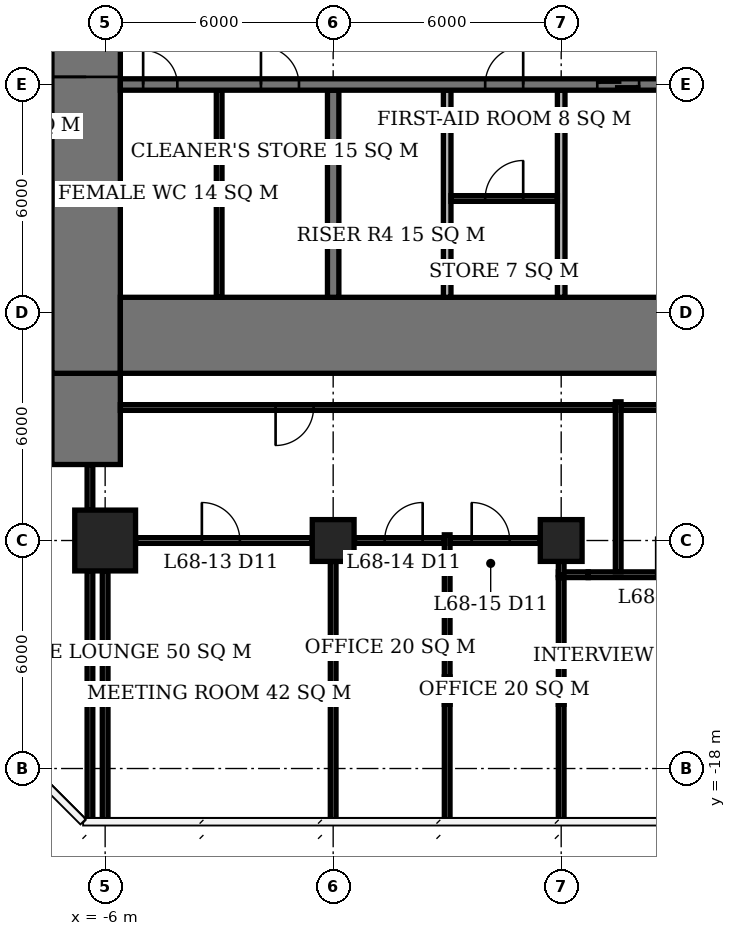
"""IFC4 building model, lengths in metres.
Left out: names, types, materials, properties, quantities, classifications, styles, units other than length and angle.
Written with IfcOpenShell. Run it as: python <this file> out.ifc"""

import sys

from ifc_helpers import new_model, si_unit, direction, frame, frame_2d, origin, origin_2d, place, context, subcontext, project, spatial, rectangle, extrude, element, fill, save


model = new_model("IFC4")
c1 = context("Model", 3, precision=1e-05, world=origin(), true_north=direction((0.0, 1.0)))
c2 = subcontext(c1, "Body", "Model", "MODEL_VIEW")
j1 = project(units=[si_unit("LENGTHUNIT", "METRE"), si_unit("PLANEANGLEUNIT", "RADIAN")], contexts=[c1])
p1 = place(None, origin())
s1 = spatial("IfcSite", under=j1, at=p1, CompositionType="ELEMENT")
p2 = place(p1, origin())
s2 = spatial("IfcBuilding", under=s1, at=p2, CompositionType="ELEMENT")
p3 = place(p2, frame((0.0, 0.0, 276.2)))
s3 = spatial("IfcBuildingStorey", under=s2, at=p3, CompositionType="ELEMENT", Elevation=276.2)
p4 = place(p3, frame((-6.0, -12.0, 0.0), z_axis=(0.0, 0.0, 1.0), x_axis=(1.0, 0.0, 0.0)))
e1 = element("IfcColumn", 1, at=p4, inside=s3, PredefinedType="COLUMN", context=c2, shape_type="SweptSolid", body=[
    extrude(rectangle(XDim=1.6, YDim=1.6, at=origin_2d()), origin(), (0.0, 0.0, 1.0), 3.9),
])
for number, where, z_axis, x_axis in (
    (2, (0.0, -12.0, 0.0), (0.0, 0.0, 1.0), (1.0, 0.0, 0.0)),
    (3, (6.0, -12.0, 0.0), (0.0, 0.0, 1.0), (1.0, 0.0, 0.0)),
):
    element("IfcColumn", number, at=place(p3, frame(where, z_axis=z_axis, x_axis=x_axis)), inside=s3, PredefinedType="COLUMN", context=c2, shape_type="SweptSolid", body=[
        extrude(rectangle(XDim=1.1, YDim=1.1, at=origin_2d()), origin(), (0.0, 0.0, 1.0), 3.9),
    ])
p5 = place(p3, frame((-5.6, -6.6, 0.0), z_axis=(0.0, 0.0, 1.0), x_axis=(1.0, 0.0, 0.0)))
e4 = element("IfcWall", 4, at=p5, inside=s3, PredefinedType="SHEAR", context=c2, shape_type="SweptSolid", body=[
    extrude(rectangle(XDim=23.2, YDim=2.0, at=frame_2d((11.6, 0.0))), origin(), (0.0, 0.0, 1.0), 3.9),
])
p6 = place(p3, frame((-6.5, -7.6, 0.0), z_axis=(0.0, 0.0, 1.0), x_axis=(0.0, 1.0, 0.0)))
e5 = element("IfcWall", 5, at=p6, inside=s3, PredefinedType="SHEAR", context=c2, shape_type="SweptSolid", body=[
    extrude(rectangle(XDim=21.2, YDim=1.8, at=frame_2d((10.6, 0.0))), origin(), (0.0, 0.0, 1.0), 3.9),
])
p7 = place(p6, frame((7.8, 0.0, 0.0)))
e6 = element("IfcOpeningElement", 6, at=p7, cuts=e5, PredefinedType="OPENING", context=c2, shape_type="SweptSolid", body=[
    extrude(rectangle(XDim=1.8, YDim=2.4, at=frame_2d((0.9, 1.2))), frame((0.0, 0.91, 0.0), z_axis=(0.0, -1.0, 0.0), x_axis=(1.0, 0.0, 0.0)), (0.0, 0.0, 1.0), 1.82),
])
p8 = place(p3, frame((-6.5, -10.0, 0.0), z_axis=(0.0, 0.0, 1.0), x_axis=(0.0, 1.0, 0.0)))
e7 = element("IfcWall", 7, at=p8, inside=s3, PredefinedType="SHEAR", context=c2, shape_type="SweptSolid", body=[
    extrude(rectangle(XDim=2.4, YDim=1.8, at=frame_2d((1.2, 0.0))), origin(), (0.0, 0.0, 1.0), 3.9),
])
p9 = place(p3, frame((-5.6, 0.0, 0.0), z_axis=(0.0, 0.0, 1.0), x_axis=(1.0, 0.0, 0.0)))
e8 = element("IfcWall", 8, at=p9, inside=s3, PredefinedType="SHEAR", context=c2, shape_type="SweptSolid", body=[
    extrude(rectangle(XDim=17.75, YDim=0.3, at=frame_2d((8.875, 0.0))), origin(), (0.0, 0.0, 1.0), 3.9),
])
p10 = place(p9, frame((0.6, 0.0, 0.0)))
e9 = element("IfcOpeningElement", 9, at=p10, cuts=e8, PredefinedType="OPENING", context=c2, shape_type="SweptSolid", body=[
    extrude(rectangle(XDim=0.9, YDim=2.1, at=frame_2d((0.45, 1.05))), frame((0.0, 0.16, 0.0), z_axis=(0.0, -1.0, 0.0), x_axis=(1.0, 0.0, 0.0)), (0.0, 0.0, 1.0), 0.32),
])
p11 = place(p9, frame((3.7, 0.0, 0.0)))
e10 = element("IfcOpeningElement", 10, at=p11, cuts=e8, PredefinedType="OPENING", context=c2, shape_type="SweptSolid", body=[
    extrude(rectangle(XDim=1.0, YDim=2.1, at=frame_2d((0.5, 1.05))), frame((0.0, 0.16, 0.0), z_axis=(0.0, -1.0, 0.0), x_axis=(1.0, 0.0, 0.0)), (0.0, 0.0, 1.0), 0.32),
])
p12 = place(p9, frame((9.6, 0.0, 0.0)))
e11 = element("IfcOpeningElement", 11, at=p12, cuts=e8, PredefinedType="OPENING", context=c2, shape_type="SweptSolid", body=[
    extrude(rectangle(XDim=1.0, YDim=2.1, at=frame_2d((0.5, 1.05))), frame((0.0, 0.16, 0.0), z_axis=(0.0, -1.0, 0.0), x_axis=(1.0, 0.0, 0.0)), (0.0, 0.0, 1.0), 0.32),
])
p13 = place(p9, frame((12.55, 0.0, 0.0)))
e12 = element("IfcOpeningElement", 12, at=p13, cuts=e8, PredefinedType="OPENING", context=c2, shape_type="SweptSolid", body=[
    extrude(rectangle(XDim=1.1, YDim=2.1, at=frame_2d((0.55, 1.05))), frame((0.0, 0.16, 0.0), z_axis=(0.0, -1.0, 0.0), x_axis=(1.0, 0.0, 0.0)), (0.0, 0.0, 1.0), 0.32),
])
p14 = place(p9, frame((15.55, 0.0, 0.0)))
e13 = element("IfcOpeningElement", 13, at=p14, cuts=e8, PredefinedType="OPENING", context=c2, shape_type="SweptSolid", body=[
    extrude(rectangle(XDim=1.1, YDim=2.1, at=frame_2d((0.55, 1.05))), frame((0.0, 0.16, 0.0), z_axis=(0.0, -1.0, 0.0), x_axis=(1.0, 0.0, 0.0)), (0.0, 0.0, 1.0), 0.32),
])
p15 = place(p3, frame((0.0, -5.6, 0.0), z_axis=(0.0, 0.0, 1.0), x_axis=(0.0, 1.0, 0.0)))
e14 = element("IfcWall", 14, at=p15, inside=s3, PredefinedType="SHEAR", context=c2, shape_type="SweptSolid", body=[
    extrude(rectangle(XDim=5.45, YDim=0.3, at=frame_2d((2.725, 0.0))), origin(), (0.0, 0.0, 1.0), 3.9),
])
for number, where, z_axis, x_axis in (
    (15, (3.0, -5.6, 0.0), (0.0, 0.0, 1.0), (0.0, 1.0, 0.0)),
    (16, (6.0, -5.6, 0.0), (0.0, 0.0, 1.0), (0.0, 1.0, 0.0)),
):
    element("IfcWall", number, at=place(p3, frame(where, z_axis=z_axis, x_axis=x_axis)), inside=s3, PredefinedType="SOLIDWALL", context=c2, shape_type="SweptSolid", body=[
        extrude(rectangle(XDim=5.45, YDim=0.2, at=frame_2d((2.725, 0.0))), origin(), (0.0, 0.0, 1.0), 3.9),
    ])
p16 = place(p3, frame((-3.0, -5.6, 0.0), z_axis=(0.0, 0.0, 1.0), x_axis=(0.0, 1.0, 0.0)))
e17 = element("IfcWall", 17, at=p16, inside=s3, PredefinedType="PLUMBINGWALL", context=c2, shape_type="SweptSolid", body=[
    extrude(rectangle(XDim=5.45, YDim=0.15, at=frame_2d((2.725, 0.0))), origin(), (0.0, 0.0, 1.0), 3.65),
])
p17 = place(p3, frame((3.1, -3.0, 0.0), z_axis=(0.0, 0.0, 1.0), x_axis=(1.0, 0.0, 0.0)))
e18 = element("IfcWall", 18, at=p17, inside=s3, PredefinedType="PARTITIONING", context=c2, shape_type="SweptSolid", body=[
    extrude(rectangle(XDim=2.8, YDim=0.15, at=frame_2d((1.4, 0.0))), origin(), (0.0, 0.0, 1.0), 3.65),
])
p18 = place(p17, frame((0.9, 0.0, 0.0)))
e19 = element("IfcOpeningElement", 19, at=p18, cuts=e18, PredefinedType="OPENING", context=c2, shape_type="SweptSolid", body=[
    extrude(rectangle(XDim=1.0, YDim=2.1, at=frame_2d((0.5, 1.05))), frame((0.0, 0.085, 0.0), z_axis=(0.0, -1.0, 0.0), x_axis=(1.0, 0.0, 0.0)), (0.0, 0.0, 1.0), 0.17),
])
p19 = place(p3, frame((5.925, -12.9, 0.0), z_axis=(0.0, 0.0, 1.0), x_axis=(1.0, 0.0, 0.0)))
e20 = element("IfcWall", 20, at=p19, inside=s3, PredefinedType="PARTITIONING", context=c2, shape_type="SweptSolid", body=[
    extrude(rectangle(XDim=0.785, YDim=0.15, at=frame_2d((0.393, 0.0))), origin(), (0.0, 0.0, 1.0), 2.65),
])
p20 = place(p3, frame((6.71, -12.9, 0.0), z_axis=(0.0, 0.0, 1.0), x_axis=(1.0, 0.0, 0.0)))
e21 = element("IfcWall", 21, at=p20, inside=s3, PredefinedType="PARTITIONING", context=c2, shape_type="SweptSolid", body=[
    extrude(rectangle(XDim=4.58, YDim=0.15, at=frame_2d((2.29, 0.0))), origin(), (0.0, 0.0, 1.0), 3.65),
])
p21 = place(p20, frame((1.79, 0.0, 0.0)))
e22 = element("IfcOpeningElement", 22, at=p21, cuts=e21, PredefinedType="OPENING", context=c2, shape_type="SweptSolid", body=[
    extrude(rectangle(XDim=1.0, YDim=2.4, at=frame_2d((0.5, 1.2))), frame((0.0, 0.085, 0.0), z_axis=(0.0, -1.0, 0.0), x_axis=(1.0, 0.0, 0.0)), (0.0, 0.0, 1.0), 0.17),
])
p22 = place(p3, frame((-5.2, -12.0, 0.0), z_axis=(0.0, 0.0, 1.0), x_axis=(1.0, 0.0, 0.0)))
e23 = element("IfcWall", 23, at=p22, inside=s3, PredefinedType="PARTITIONING", context=c2, shape_type="SweptSolid", body=[
    extrude(rectangle(XDim=4.64, YDim=0.15, at=frame_2d((2.32, 0.0))), origin(), (0.0, 0.0, 1.0), 3.65),
])
p23 = place(p22, frame((1.745, 0.0, 0.0)))
e24 = element("IfcOpeningElement", 24, at=p23, cuts=e23, PredefinedType="OPENING", context=c2, shape_type="SweptSolid", body=[
    extrude(rectangle(XDim=1.0, YDim=2.4, at=frame_2d((0.5, 1.2))), frame((0.0, 0.085, 0.0), z_axis=(0.0, -1.0, 0.0), x_axis=(1.0, 0.0, 0.0)), (0.0, 0.0, 1.0), 0.17),
])
p24 = place(p3, frame((0.56, -12.0, 0.0), z_axis=(0.0, 0.0, 1.0), x_axis=(1.0, 0.0, 0.0)))
e25 = element("IfcWall", 25, at=p24, inside=s3, PredefinedType="PARTITIONING", context=c2, shape_type="SweptSolid", body=[
    extrude(rectangle(XDim=2.365, YDim=0.15, at=frame_2d((1.183, 0.0))), origin(), (0.0, 0.0, 1.0), 3.65),
])
p25 = place(p24, frame((0.795, 0.0, 0.0)))
e26 = element("IfcOpeningElement", 26, at=p25, cuts=e25, PredefinedType="OPENING", context=c2, shape_type="SweptSolid", body=[
    extrude(rectangle(XDim=1.0, YDim=2.4, at=frame_2d((0.5, 1.2))), frame((0.0, 0.085, 0.0), z_axis=(0.0, -1.0, 0.0), x_axis=(1.0, 0.0, 0.0)), (0.0, 0.0, 1.0), 0.17),
])
p26 = place(p3, frame((3.075, -12.0, 0.0), z_axis=(0.0, 0.0, 1.0), x_axis=(1.0, 0.0, 0.0)))
e27 = element("IfcWall", 27, at=p26, inside=s3, PredefinedType="PARTITIONING", context=c2, shape_type="SweptSolid", body=[
    extrude(rectangle(XDim=2.365, YDim=0.15, at=frame_2d((1.183, 0.0))), origin(), (0.0, 0.0, 1.0), 3.65),
])
p27 = place(p26, frame((0.57, 0.0, 0.0)))
e28 = element("IfcOpeningElement", 28, at=p27, cuts=e27, PredefinedType="OPENING", context=c2, shape_type="SweptSolid", body=[
    extrude(rectangle(XDim=1.0, YDim=2.4, at=frame_2d((0.5, 1.2))), frame((0.0, 0.085, 0.0), z_axis=(0.0, -1.0, 0.0), x_axis=(1.0, 0.0, 0.0)), (0.0, 0.0, 1.0), 0.17),
])
p28 = place(p3, frame((-6.0, -19.375, 0.0), z_axis=(0.0, 0.0, 1.0), x_axis=(0.0, 1.0, 0.0)))
e29 = element("IfcWall", 29, at=p28, inside=s3, PredefinedType="PARTITIONING", context=c2, shape_type="SweptSolid", body=[
    extrude(rectangle(XDim=3.065, YDim=0.15, at=frame_2d((1.532, 0.0))), origin(), (0.0, 0.0, 1.0), 3.65),
])
p29 = place(p3, frame((-6.0, -16.31, 0.0), z_axis=(0.0, 0.0, 1.0), x_axis=(0.0, 1.0, 0.0)))
e30 = element("IfcWall", 30, at=p29, inside=s3, PredefinedType="PARTITIONING", context=c2, shape_type="SweptSolid", body=[
    extrude(rectangle(XDim=3.51, YDim=0.15, at=frame_2d((1.755, 0.0))), origin(), (0.0, 0.0, 1.0), 2.65),
])
p30 = place(p3, frame((0.0, -19.375, 0.0), z_axis=(0.0, 0.0, 1.0), x_axis=(0.0, 1.0, 0.0)))
e31 = element("IfcWall", 31, at=p30, inside=s3, PredefinedType="PARTITIONING", context=c2, shape_type="SweptSolid", body=[
    extrude(rectangle(XDim=3.065, YDim=0.15, at=frame_2d((1.532, 0.0))), origin(), (0.0, 0.0, 1.0), 3.65),
])
p31 = place(p3, frame((0.0, -16.31, 0.0), z_axis=(0.0, 0.0, 1.0), x_axis=(0.0, 1.0, 0.0)))
e32 = element("IfcWall", 32, at=p31, inside=s3, PredefinedType="PARTITIONING", context=c2, shape_type="SweptSolid", body=[
    extrude(rectangle(XDim=3.76, YDim=0.15, at=frame_2d((1.88, 0.0))), origin(), (0.0, 0.0, 1.0), 2.65),
])
p32 = place(p3, frame((3.0, -19.375, 0.0), z_axis=(0.0, 0.0, 1.0), x_axis=(0.0, 1.0, 0.0)))
e33 = element("IfcWall", 33, at=p32, inside=s3, PredefinedType="PARTITIONING", context=c2, shape_type="SweptSolid", body=[
    extrude(rectangle(XDim=3.065, YDim=0.15, at=frame_2d((1.532, 0.0))), origin(), (0.0, 0.0, 1.0), 3.65),
])
p33 = place(p3, frame((3.0, -16.31, 0.0), z_axis=(0.0, 0.0, 1.0), x_axis=(0.0, 1.0, 0.0)))
e34 = element("IfcWall", 34, at=p33, inside=s3, PredefinedType="PARTITIONING", context=c2, shape_type="SweptSolid", body=[
    extrude(rectangle(XDim=0.72, YDim=0.15, at=frame_2d((0.36, 0.0))), origin(), (0.0, 0.0, 1.0), 2.65),
])
p34 = place(p3, frame((3.0, -15.59, 0.0), z_axis=(0.0, 0.0, 1.0), x_axis=(0.0, 1.0, 0.0)))
e35 = element("IfcWall", 35, at=p34, inside=s3, PredefinedType="PARTITIONING", context=c2, shape_type="SweptSolid", body=[
    extrude(rectangle(XDim=3.74, YDim=0.15, at=frame_2d((1.87, 0.0))), origin(), (0.0, 0.0, 1.0), 3.65),
])
p35 = place(p3, frame((6.0, -19.35, 0.0), z_axis=(0.0, 0.0, 1.0), x_axis=(0.0, 1.0, 0.0)))
e36 = element("IfcWall", 36, at=p35, inside=s3, PredefinedType="PARTITIONING", context=c2, shape_type="SweptSolid", body=[
    extrude(rectangle(XDim=3.04, YDim=0.15, at=frame_2d((1.52, 0.0))), origin(), (0.0, 0.0, 1.0), 3.65),
])
p36 = place(p3, frame((6.0, -16.31, 0.0), z_axis=(0.0, 0.0, 1.0), x_axis=(0.0, 1.0, 0.0)))
e37 = element("IfcWall", 37, at=p36, inside=s3, PredefinedType="PARTITIONING", context=c2, shape_type="SweptSolid", body=[
    extrude(rectangle(XDim=3.335, YDim=0.15, at=frame_2d((1.667, 0.0))), origin(), (0.0, 0.0, 1.0), 2.65),
])
p37 = place(p3, frame((6.0, -12.9, 0.0), z_axis=(0.0, 0.0, 1.0), x_axis=(0.0, 1.0, 0.0)))
e38 = element("IfcWall", 38, at=p37, inside=s3, PredefinedType="PARTITIONING", context=c2, shape_type="SweptSolid", body=[
    extrude(rectangle(XDim=0.35, YDim=0.15, at=frame_2d((0.175, 0.0))), origin(), (0.0, 0.0, 1.0), 2.65),
])
p38 = place(p3, frame((-6.4, -19.375, 0.0), z_axis=(0.0, 0.0, 1.0), x_axis=(0.0, 1.0, 0.0)))
e39 = element("IfcWall", 39, at=p38, inside=s3, PredefinedType="PARTITIONING", context=c2, shape_type="SweptSolid", body=[
    extrude(rectangle(XDim=3.235, YDim=0.15, at=frame_2d((1.618, 0.0))), origin(), (0.0, 0.0, 1.0), 3.65),
])
p39 = place(p3, frame((-6.4, -16.14, 0.0), z_axis=(0.0, 0.0, 1.0), x_axis=(0.0, 1.0, 0.0)))
e40 = element("IfcWall", 40, at=p39, inside=s3, PredefinedType="PARTITIONING", context=c2, shape_type="SweptSolid", body=[
    extrude(rectangle(XDim=3.34, YDim=0.15, at=frame_2d((1.67, 0.0))), origin(), (0.0, 0.0, 1.0), 2.65),
])
p40 = place(p3, frame((-6.4, -11.2, 0.0), z_axis=(0.0, 0.0, 1.0), x_axis=(0.0, 1.0, 0.0)))
e41 = element("IfcWall", 41, at=p40, inside=s3, PredefinedType="PARTITIONING", context=c2, shape_type="SweptSolid", body=[
    extrude(rectangle(XDim=1.2, YDim=0.15, at=frame_2d((0.6, 0.0))), origin(), (0.0, 0.0, 1.0), 3.65),
])
p41 = place(p3, frame((7.425, -8.5, 0.0), z_axis=(0.0, 0.0, 1.0), x_axis=(-1.0, 0.0, 0.0)))
e42 = element("IfcWall", 42, at=p41, inside=s3, PredefinedType="PARTITIONING", context=c2, shape_type="SweptSolid", body=[
    extrude(rectangle(XDim=13.025, YDim=0.15, at=frame_2d((6.513, 0.0))), origin(), (0.0, 0.0, 1.0), 3.65),
])
p42 = place(p41, frame((7.94, 0.0, 0.0)))
e43 = element("IfcOpeningElement", 43, at=p42, cuts=e42, PredefinedType="OPENING", context=c2, shape_type="SweptSolid", body=[
    extrude(rectangle(XDim=1.0, YDim=2.4, at=frame_2d((0.5, 1.2))), frame((0.0, 0.085, 0.0), z_axis=(0.0, -1.0, 0.0), x_axis=(1.0, 0.0, 0.0)), (0.0, 0.0, 1.0), 0.17),
])
p43 = place(p3, frame((7.5, -12.825, 0.0), z_axis=(0.0, 0.0, 1.0), x_axis=(0.0, 1.0, 0.0)))
e44 = element("IfcWall", 44, at=p43, inside=s3, PredefinedType="PARTITIONING", context=c2, shape_type="SweptSolid", body=[
    extrude(rectangle(XDim=4.475, YDim=0.15, at=frame_2d((2.237, 0.0))), origin(), (0.0, 0.0, 1.0), 3.65),
])
p44 = place(p3, frame((7.575, -8.5, 0.0), z_axis=(0.0, 0.0, 1.0), x_axis=(1.0, 0.0, 0.0)))
e45 = element("IfcWall", 45, at=p44, inside=s3, PredefinedType="PARTITIONING", context=c2, shape_type="SweptSolid", body=[
    extrude(rectangle(XDim=10.025, YDim=0.15, at=frame_2d((5.013, 0.0))), origin(), (0.0, 0.0, 1.0), 3.65),
])
p45 = place(p7, origin())
e46 = element("IfcDoor", 46, at=p45, inside=s3, OperationType="DOUBLE_DOOR_SINGLE_SWING", PredefinedType="DOOR", context=c2, shape_type="SweptSolid", body=[
    extrude(rectangle(XDim=1.8, YDim=2.4, at=frame_2d((0.9, 1.2))), frame((0.0, 0.025, 0.0), z_axis=(0.0, -1.0, 0.0), x_axis=(1.0, 0.0, 0.0)), (0.0, 0.0, 1.0), 0.05),
])
fill(e6, e46)
p46 = place(p10, origin())
e47 = element("IfcDoor", 47, at=p46, inside=s3, OperationType="SINGLE_SWING_LEFT", PredefinedType="DOOR", context=c2, shape_type="SweptSolid", body=[
    extrude(rectangle(XDim=0.9, YDim=2.1, at=frame_2d((0.45, 1.05))), frame((0.0, 0.025, 0.0), z_axis=(0.0, -1.0, 0.0), x_axis=(1.0, 0.0, 0.0)), (0.0, 0.0, 1.0), 0.05),
])
fill(e9, e47)
p47 = place(p11, origin())
e48 = element("IfcDoor", 48, at=p47, inside=s3, OperationType="SINGLE_SWING_LEFT", PredefinedType="DOOR", context=c2, shape_type="SweptSolid", body=[
    extrude(rectangle(XDim=1.0, YDim=2.1, at=frame_2d((0.5, 1.05))), frame((0.0, 0.025, 0.0), z_axis=(0.0, -1.0, 0.0), x_axis=(1.0, 0.0, 0.0)), (0.0, 0.0, 1.0), 0.05),
])
fill(e10, e48)
p48 = place(p18, origin())
e49 = element("IfcDoor", 49, at=p48, inside=s3, OperationType="SINGLE_SWING_RIGHT", PredefinedType="DOOR", context=c2, shape_type="SweptSolid", body=[
    extrude(rectangle(XDim=1.0, YDim=2.1, at=frame_2d((0.5, 1.05))), frame((0.0, 0.025, 0.0), z_axis=(0.0, -1.0, 0.0), x_axis=(1.0, 0.0, 0.0)), (0.0, 0.0, 1.0), 0.05),
])
fill(e19, e49)
p49 = place(p12, origin())
e50 = element("IfcDoor", 50, at=p49, inside=s3, OperationType="SINGLE_SWING_RIGHT", PredefinedType="DOOR", context=c2, shape_type="SweptSolid", body=[
    extrude(rectangle(XDim=1.0, YDim=2.1, at=frame_2d((0.5, 1.05))), frame((0.0, 0.025, 0.0), z_axis=(0.0, -1.0, 0.0), x_axis=(1.0, 0.0, 0.0)), (0.0, 0.0, 1.0), 0.05),
])
fill(e11, e50)
p50 = place(p13, origin())
e51 = element("IfcDoor", 51, at=p50, inside=s3, OperationType="DOUBLE_DOOR_SLIDING", PredefinedType="USERDEFINED", context=c2, shape_type="SweptSolid", body=[
    extrude(rectangle(XDim=1.1, YDim=2.1, at=frame_2d((0.55, 1.05))), frame((0.0, 0.025, 0.0), z_axis=(0.0, -1.0, 0.0), x_axis=(1.0, 0.0, 0.0)), (0.0, 0.0, 1.0), 0.05),
])
fill(e12, e51)
p51 = place(p23, origin())
e52 = element("IfcDoor", 52, at=p51, inside=s3, OperationType="SINGLE_SWING_LEFT", PredefinedType="DOOR", context=c2, shape_type="SweptSolid", body=[
    extrude(rectangle(XDim=1.0, YDim=2.4, at=frame_2d((0.5, 1.2))), frame((0.0, 0.025, 0.0), z_axis=(0.0, -1.0, 0.0), x_axis=(1.0, 0.0, 0.0)), (0.0, 0.0, 1.0), 0.05),
])
fill(e24, e52)
p52 = place(p25, origin())
e53 = element("IfcDoor", 53, at=p52, inside=s3, OperationType="SINGLE_SWING_RIGHT", PredefinedType="DOOR", context=c2, shape_type="SweptSolid", body=[
    extrude(rectangle(XDim=1.0, YDim=2.4, at=frame_2d((0.5, 1.2))), frame((0.0, 0.025, 0.0), z_axis=(0.0, -1.0, 0.0), x_axis=(1.0, 0.0, 0.0)), (0.0, 0.0, 1.0), 0.05),
])
fill(e26, e53)
p53 = place(p27, origin())
e54 = element("IfcDoor", 54, at=p53, inside=s3, OperationType="SINGLE_SWING_LEFT", PredefinedType="DOOR", context=c2, shape_type="SweptSolid", body=[
    extrude(rectangle(XDim=1.0, YDim=2.4, at=frame_2d((0.5, 1.2))), frame((0.0, 0.025, 0.0), z_axis=(0.0, -1.0, 0.0), x_axis=(1.0, 0.0, 0.0)), (0.0, 0.0, 1.0), 0.05),
])
fill(e28, e54)
p54 = place(p42, origin())
e55 = element("IfcDoor", 55, at=p54, inside=s3, OperationType="SINGLE_SWING_RIGHT", PredefinedType="DOOR", context=c2, shape_type="SweptSolid", body=[
    extrude(rectangle(XDim=1.0, YDim=2.4, at=frame_2d((0.5, 1.2))), frame((0.0, 0.025, 0.0), z_axis=(0.0, -1.0, 0.0), x_axis=(1.0, 0.0, 0.0)), (0.0, 0.0, 1.0), 0.05),
])
fill(e43, e55)
save(model, sys.argv[1])
